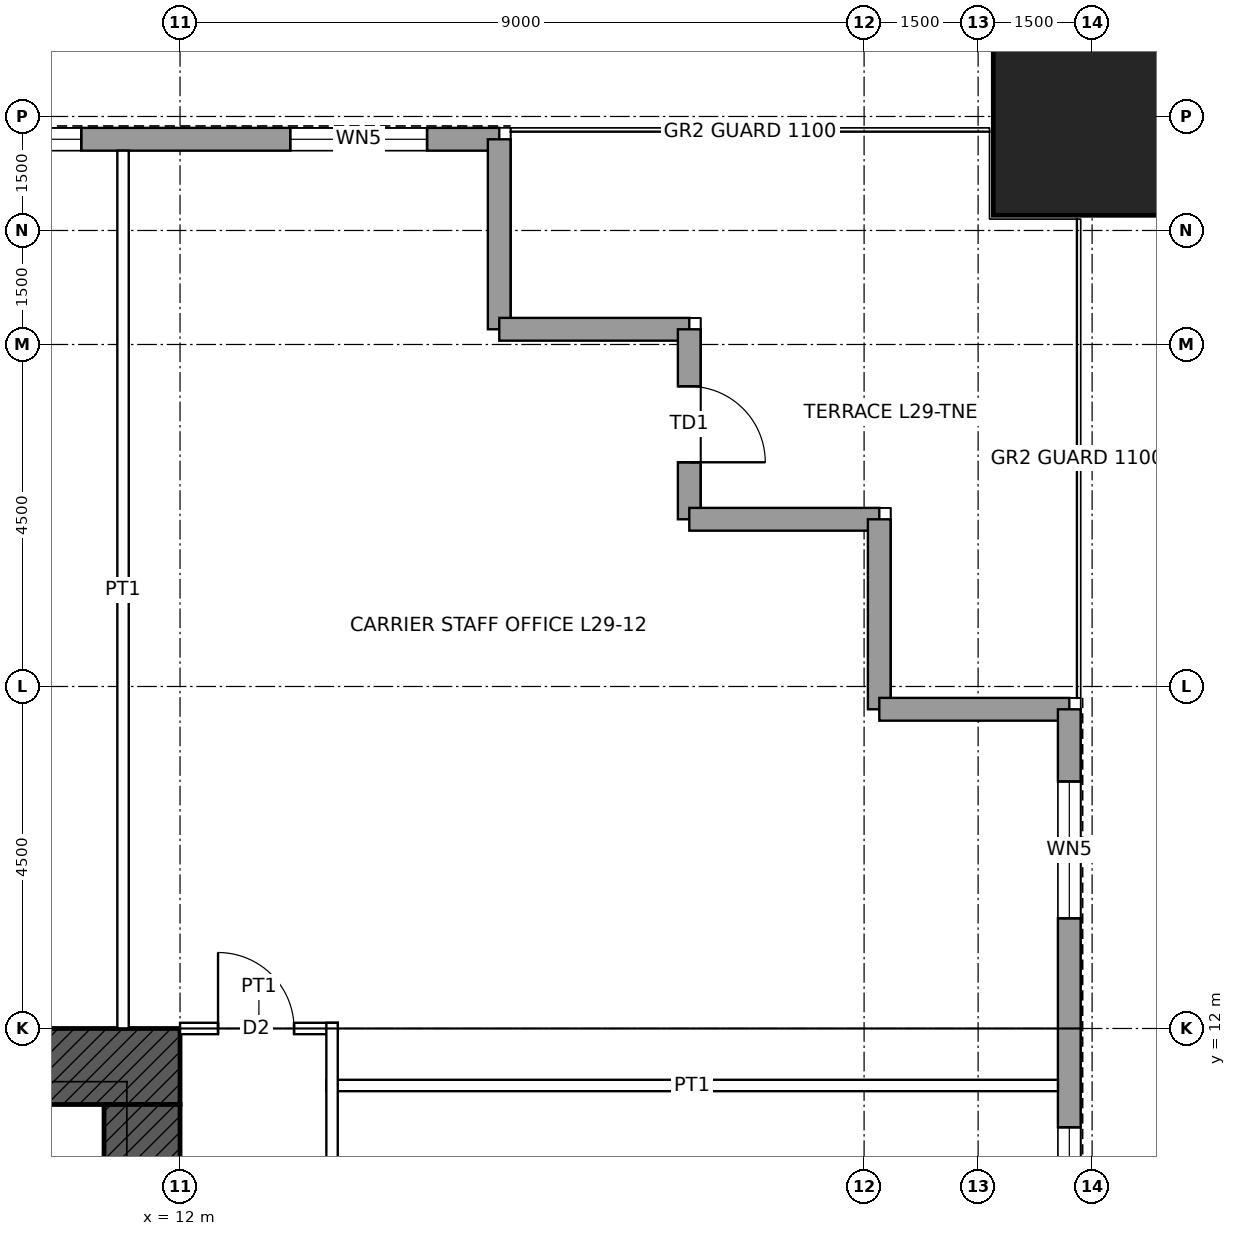
"""IFC4 building model, lengths in metres.
Left out: names, types, materials, properties, quantities, classifications, styles, units other than length and angle.
Written with IfcOpenShell. Run it as: python <this file> out.ifc"""

import sys

from ifc_helpers import new_model, si_unit, direction, frame, frame_2d, origin, origin_2d, place, context, subcontext, project, spatial, rectangle, hollow_rectangle, extrude, element, fill, save


model = new_model("IFC4")
c1 = context("Model", 3, precision=1e-05, world=origin(), true_north=direction((0.0, 1.0)))
c2 = subcontext(c1, "Body", "Model", "MODEL_VIEW")
j1 = project(units=[si_unit("LENGTHUNIT", "METRE"), si_unit("PLANEANGLEUNIT", "RADIAN")], contexts=[c1])
p1 = place(None, origin())
s1 = spatial("IfcSite", under=j1, at=p1, CompositionType="ELEMENT")
p2 = place(p1, origin())
s2 = spatial("IfcBuilding", under=s1, at=p2, CompositionType="ELEMENT")
p3 = place(p2, frame((0.0, 0.0, 144.9)))
s3 = spatial("IfcBuildingStorey", under=s2, at=p3, CompositionType="ELEMENT", Elevation=144.9)
p4 = place(p3, frame((24.0, 24.0, 0.0), z_axis=(0.0, 0.0, 1.0), x_axis=(1.0, 0.0, 0.0)))
e1 = element("IfcColumn", 1, at=p4, inside=s3, PredefinedType="COLUMN", context=c2, shape_type="SweptSolid", body=[
    extrude(hollow_rectangle(XDim=2.6, YDim=2.6, WallThickness=0.13, at=origin_2d()), origin(), (0.0, 0.0, 1.0), 4.5),
])
p5 = place(p3, frame((-12.0, 11.5, 0.0), z_axis=(0.0, 0.0, 1.0), x_axis=(1.0, 0.0, 0.0)))
e2 = element("IfcWall", 2, at=p5, inside=s3, PredefinedType="SHEAR", context=c2, shape_type="SweptSolid", body=[
    extrude(rectangle(XDim=24.0, YDim=1.0, at=frame_2d((12.0, 0.0))), origin(), (0.0, 0.0, 1.0), 4.5),
])
p6 = place(p5, frame((6.25, 0.0, 0.0)))
e3 = element("IfcOpeningElement", 3, at=p6, cuts=e2, PredefinedType="OPENING", context=c2, shape_type="SweptSolid", body=[
    extrude(rectangle(XDim=1.0, YDim=2.4, at=frame_2d((0.5, 1.2))), frame((0.0, 0.51, 0.0), z_axis=(0.0, -1.0, 0.0), x_axis=(1.0, 0.0, 0.0)), (0.0, 0.0, 1.0), 1.02),
])
p7 = place(p5, frame((16.75, 0.0, 0.0)))
e4 = element("IfcOpeningElement", 4, at=p7, cuts=e2, PredefinedType="OPENING", context=c2, shape_type="SweptSolid", body=[
    extrude(rectangle(XDim=1.0, YDim=2.4, at=frame_2d((0.5, 1.2))), frame((0.0, 0.51, 0.0), z_axis=(0.0, -1.0, 0.0), x_axis=(1.0, 0.0, 0.0)), (0.0, 0.0, 1.0), 1.02),
])
p8 = place(p3, frame((11.5, 11.0, 0.0), z_axis=(0.0, 0.0, 1.0), x_axis=(0.0, -1.0, 0.0)))
e5 = element("IfcWall", 5, at=p8, inside=s3, PredefinedType="SHEAR", context=c2, shape_type="SweptSolid", body=[
    extrude(rectangle(XDim=22.0, YDim=1.0, at=frame_2d((11.0, 0.0))), origin(), (0.0, 0.0, 1.0), 4.5),
])
p9 = place(p8, frame((10.5, 0.0, 0.0)))
e6 = element("IfcOpeningElement", 6, at=p9, cuts=e5, PredefinedType="OPENING", context=c2, shape_type="SweptSolid", body=[
    extrude(rectangle(XDim=1.0, YDim=2.4, at=frame_2d((0.5, 1.2))), frame((0.0, 0.51, 0.0), z_axis=(0.0, -1.0, 0.0), x_axis=(1.0, 0.0, 0.0)), (0.0, 0.0, 1.0), 1.02),
])
p10 = place(p3, frame((-16.2, 23.7, 0.0), z_axis=(0.0, 0.0, 1.0), x_axis=(1.0, 0.0, 0.0)))
e7 = element("IfcWall", 7, at=p10, inside=s3, PredefinedType="SOLIDWALL", context=c2, shape_type="SweptSolid", body=[
    extrude(rectangle(XDim=32.4, YDim=0.3, at=frame_2d((16.2, 0.0))), origin(), (0.0, 0.0, 1.0), 4.3),
])
p11 = place(p10, frame((0.95, 0.0, 1.0)))
e8 = element("IfcOpeningElement", 8, at=p11, cuts=e7, PredefinedType="OPENING", context=c2, shape_type="SweptSolid", body=[
    extrude(rectangle(XDim=1.8, YDim=1.2, at=frame_2d((0.9, 0.6))), frame((0.0, 0.16, 0.0), z_axis=(0.0, -1.0, 0.0), x_axis=(1.0, 0.0, 0.0)), (0.0, 0.0, 1.0), 0.32),
])
p12 = place(p10, frame((5.5, 0.0, 1.0)))
e9 = element("IfcOpeningElement", 9, at=p12, cuts=e7, PredefinedType="OPENING", context=c2, shape_type="SweptSolid", body=[
    extrude(rectangle(XDim=2.4, YDim=1.2, at=frame_2d((1.2, 0.6))), frame((0.0, 0.16, 0.0), z_axis=(0.0, -1.0, 0.0), x_axis=(1.0, 0.0, 0.0)), (0.0, 0.0, 1.0), 0.32),
])
p13 = place(p10, frame((9.5, 0.0, 1.0)))
e10 = element("IfcOpeningElement", 10, at=p13, cuts=e7, PredefinedType="OPENING", context=c2, shape_type="SweptSolid", body=[
    extrude(rectangle(XDim=2.4, YDim=1.2, at=frame_2d((1.2, 0.6))), frame((0.0, 0.16, 0.0), z_axis=(0.0, -1.0, 0.0), x_axis=(1.0, 0.0, 0.0)), (0.0, 0.0, 1.0), 0.32),
])
p14 = place(p10, frame((13.0, 0.0, 1.0)))
e11 = element("IfcOpeningElement", 11, at=p14, cuts=e7, PredefinedType="OPENING", context=c2, shape_type="SweptSolid", body=[
    extrude(rectangle(XDim=2.4, YDim=1.2, at=frame_2d((1.2, 0.6))), frame((0.0, 0.16, 0.0), z_axis=(0.0, -1.0, 0.0), x_axis=(1.0, 0.0, 0.0)), (0.0, 0.0, 1.0), 0.32),
])
p15 = place(p10, frame((17.0, 0.0, 1.0)))
e12 = element("IfcOpeningElement", 12, at=p15, cuts=e7, PredefinedType="OPENING", context=c2, shape_type="SweptSolid", body=[
    extrude(rectangle(XDim=2.4, YDim=1.2, at=frame_2d((1.2, 0.6))), frame((0.0, 0.16, 0.0), z_axis=(0.0, -1.0, 0.0), x_axis=(1.0, 0.0, 0.0)), (0.0, 0.0, 1.0), 0.32),
])
p16 = place(p10, frame((20.5, 0.0, 1.0)))
e13 = element("IfcOpeningElement", 13, at=p16, cuts=e7, PredefinedType="OPENING", context=c2, shape_type="SweptSolid", body=[
    extrude(rectangle(XDim=2.4, YDim=1.2, at=frame_2d((1.2, 0.6))), frame((0.0, 0.16, 0.0), z_axis=(0.0, -1.0, 0.0), x_axis=(1.0, 0.0, 0.0)), (0.0, 0.0, 1.0), 0.32),
])
p17 = place(p10, frame((24.5, 0.0, 1.0)))
e14 = element("IfcOpeningElement", 14, at=p17, cuts=e7, PredefinedType="OPENING", context=c2, shape_type="SweptSolid", body=[
    extrude(rectangle(XDim=2.4, YDim=1.2, at=frame_2d((1.2, 0.6))), frame((0.0, 0.16, 0.0), z_axis=(0.0, -1.0, 0.0), x_axis=(1.0, 0.0, 0.0)), (0.0, 0.0, 1.0), 0.32),
])
p18 = place(p10, frame((29.65, 0.0, 1.0)))
e15 = element("IfcOpeningElement", 15, at=p18, cuts=e7, PredefinedType="OPENING", context=c2, shape_type="SweptSolid", body=[
    extrude(rectangle(XDim=1.8, YDim=1.2, at=frame_2d((0.9, 0.6))), frame((0.0, 0.16, 0.0), z_axis=(0.0, -1.0, 0.0), x_axis=(1.0, 0.0, 0.0)), (0.0, 0.0, 1.0), 0.32),
])
for number, where, z_axis, x_axis in (
    (16, (16.2, 23.7, 0.0), (0.0, 0.0, 1.0), (0.0, -1.0, 0.0)),
    (17, (16.2, 21.2, 0.0), (0.0, 0.0, 1.0), (1.0, 0.0, 0.0)),
):
    element("IfcWall", number, at=place(p3, frame(where, z_axis=z_axis, x_axis=x_axis)), inside=s3, PredefinedType="SOLIDWALL", context=c2, shape_type="SweptSolid", body=[
        extrude(rectangle(XDim=2.5, YDim=0.3, at=frame_2d((1.25, 0.0))), origin(), (0.0, 0.0, 1.0), 4.3),
    ])
p19 = place(p3, frame((18.7, 21.2, 0.0), z_axis=(0.0, 0.0, 1.0), x_axis=(0.0, -1.0, 0.0)))
e18 = element("IfcWall", 18, at=p19, inside=s3, PredefinedType="SOLIDWALL", context=c2, shape_type="SweptSolid", body=[
    extrude(rectangle(XDim=2.5, YDim=0.3, at=frame_2d((1.25, 0.0))), origin(), (0.0, 0.0, 1.0), 4.3),
])
p20 = place(p19, frame((0.75, 0.0, 0.0)))
e19 = element("IfcOpeningElement", 19, at=p20, cuts=e18, PredefinedType="OPENING", context=c2, shape_type="SweptSolid", body=[
    extrude(rectangle(XDim=1.0, YDim=2.4, at=frame_2d((0.5, 1.2))), frame((0.0, 0.16, 0.0), z_axis=(0.0, -1.0, 0.0), x_axis=(1.0, 0.0, 0.0)), (0.0, 0.0, 1.0), 0.32),
])
for number, where, z_axis, x_axis in (
    (20, (18.7, 18.7, 0.0), (0.0, 0.0, 1.0), (1.0, 0.0, 0.0)),
    (21, (21.2, 18.7, 0.0), (0.0, 0.0, 1.0), (0.0, -1.0, 0.0)),
    (22, (21.2, 16.2, 0.0), (0.0, 0.0, 1.0), (1.0, 0.0, 0.0)),
):
    element("IfcWall", number, at=place(p3, frame(where, z_axis=z_axis, x_axis=x_axis)), inside=s3, PredefinedType="SOLIDWALL", context=c2, shape_type="SweptSolid", body=[
        extrude(rectangle(XDim=2.5, YDim=0.3, at=frame_2d((1.25, 0.0))), origin(), (0.0, 0.0, 1.0), 4.3),
    ])
p21 = place(p3, frame((23.7, 16.2, 0.0), z_axis=(0.0, 0.0, 1.0), x_axis=(0.0, -1.0, 0.0)))
e23 = element("IfcWall", 23, at=p21, inside=s3, PredefinedType="SOLIDWALL", context=c2, shape_type="SweptSolid", body=[
    extrude(rectangle(XDim=32.4, YDim=0.3, at=frame_2d((16.2, 0.0))), origin(), (0.0, 0.0, 1.0), 4.3),
])
p22 = place(p21, frame((0.95, 0.0, 1.0)))
e24 = element("IfcOpeningElement", 24, at=p22, cuts=e23, PredefinedType="OPENING", context=c2, shape_type="SweptSolid", body=[
    extrude(rectangle(XDim=1.8, YDim=1.2, at=frame_2d((0.9, 0.6))), frame((0.0, 0.16, 0.0), z_axis=(0.0, -1.0, 0.0), x_axis=(1.0, 0.0, 0.0)), (0.0, 0.0, 1.0), 0.32),
])
p23 = place(p21, frame((5.5, 0.0, 1.0)))
e25 = element("IfcOpeningElement", 25, at=p23, cuts=e23, PredefinedType="OPENING", context=c2, shape_type="SweptSolid", body=[
    extrude(rectangle(XDim=2.4, YDim=1.2, at=frame_2d((1.2, 0.6))), frame((0.0, 0.16, 0.0), z_axis=(0.0, -1.0, 0.0), x_axis=(1.0, 0.0, 0.0)), (0.0, 0.0, 1.0), 0.32),
])
p24 = place(p21, frame((9.5, 0.0, 1.0)))
e26 = element("IfcOpeningElement", 26, at=p24, cuts=e23, PredefinedType="OPENING", context=c2, shape_type="SweptSolid", body=[
    extrude(rectangle(XDim=2.4, YDim=1.2, at=frame_2d((1.2, 0.6))), frame((0.0, 0.16, 0.0), z_axis=(0.0, -1.0, 0.0), x_axis=(1.0, 0.0, 0.0)), (0.0, 0.0, 1.0), 0.32),
])
p25 = place(p21, frame((13.0, 0.0, 1.0)))
e27 = element("IfcOpeningElement", 27, at=p25, cuts=e23, PredefinedType="OPENING", context=c2, shape_type="SweptSolid", body=[
    extrude(rectangle(XDim=2.4, YDim=1.2, at=frame_2d((1.2, 0.6))), frame((0.0, 0.16, 0.0), z_axis=(0.0, -1.0, 0.0), x_axis=(1.0, 0.0, 0.0)), (0.0, 0.0, 1.0), 0.32),
])
p26 = place(p21, frame((17.0, 0.0, 1.0)))
e28 = element("IfcOpeningElement", 28, at=p26, cuts=e23, PredefinedType="OPENING", context=c2, shape_type="SweptSolid", body=[
    extrude(rectangle(XDim=2.4, YDim=1.2, at=frame_2d((1.2, 0.6))), frame((0.0, 0.16, 0.0), z_axis=(0.0, -1.0, 0.0), x_axis=(1.0, 0.0, 0.0)), (0.0, 0.0, 1.0), 0.32),
])
p27 = place(p21, frame((20.5, 0.0, 1.0)))
e29 = element("IfcOpeningElement", 29, at=p27, cuts=e23, PredefinedType="OPENING", context=c2, shape_type="SweptSolid", body=[
    extrude(rectangle(XDim=2.4, YDim=1.2, at=frame_2d((1.2, 0.6))), frame((0.0, 0.16, 0.0), z_axis=(0.0, -1.0, 0.0), x_axis=(1.0, 0.0, 0.0)), (0.0, 0.0, 1.0), 0.32),
])
p28 = place(p21, frame((24.5, 0.0, 1.0)))
e30 = element("IfcOpeningElement", 30, at=p28, cuts=e23, PredefinedType="OPENING", context=c2, shape_type="SweptSolid", body=[
    extrude(rectangle(XDim=2.4, YDim=1.2, at=frame_2d((1.2, 0.6))), frame((0.0, 0.16, 0.0), z_axis=(0.0, -1.0, 0.0), x_axis=(1.0, 0.0, 0.0)), (0.0, 0.0, 1.0), 0.32),
])
p29 = place(p21, frame((29.65, 0.0, 1.0)))
e31 = element("IfcOpeningElement", 31, at=p29, cuts=e23, PredefinedType="OPENING", context=c2, shape_type="SweptSolid", body=[
    extrude(rectangle(XDim=1.8, YDim=1.2, at=frame_2d((0.9, 0.6))), frame((0.0, 0.16, 0.0), z_axis=(0.0, -1.0, 0.0), x_axis=(1.0, 0.0, 0.0)), (0.0, 0.0, 1.0), 0.32),
])
p30 = place(p3, frame((13.925, 11.25, 0.0), z_axis=(0.0, 0.0, 1.0), x_axis=(1.0, 0.0, 0.0)))
e32 = element("IfcWall", 32, at=p30, inside=s3, PredefinedType="PARTITIONING", context=c2, shape_type="SweptSolid", body=[
    extrude(rectangle(XDim=9.625, YDim=0.15, at=frame_2d((4.812, 0.0))), origin(), (0.0, 0.0, 1.0), 3.431),
])
p31 = place(p3, frame((12.0, 12.0, 0.0), z_axis=(0.0, 0.0, 1.0), x_axis=(1.0, 0.0, 0.0)))
e33 = element("IfcWall", 33, at=p31, inside=s3, PredefinedType="PARTITIONING", context=c2, shape_type="SweptSolid", body=[
    extrude(rectangle(XDim=2.075, YDim=0.15, at=frame_2d((1.038, 0.0))), origin(), (0.0, 0.0, 1.0), 3.284),
])
p32 = place(p31, frame((0.5, 0.0, 0.0)))
e34 = element("IfcOpeningElement", 34, at=p32, cuts=e33, PredefinedType="OPENING", context=c2, shape_type="SweptSolid", body=[
    extrude(rectangle(XDim=1.0, YDim=2.1, at=frame_2d((0.5, 1.05))), frame((0.0, 0.085, 0.0), z_axis=(0.0, -1.0, 0.0), x_axis=(1.0, 0.0, 0.0)), (0.0, 0.0, 1.0), 0.17),
])
p33 = place(p3, frame((11.25, 12.0, 0.0), z_axis=(0.0, 0.0, 1.0), x_axis=(0.0, 1.0, 0.0)))
e35 = element("IfcWall", 35, at=p33, inside=s3, PredefinedType="PARTITIONING", context=c2, shape_type="SweptSolid", body=[
    extrude(rectangle(XDim=11.55, YDim=0.15, at=frame_2d((5.775, 0.0))), origin(), (0.0, 0.0, 1.0), 3.431),
])
p34 = place(p3, frame((14.0, -14.075, 0.0), z_axis=(0.0, 0.0, 1.0), x_axis=(0.0, 1.0, 0.0)))
e36 = element("IfcWall", 36, at=p34, inside=s3, PredefinedType="PARTITIONING", context=c2, shape_type="SweptSolid", body=[
    extrude(rectangle(XDim=26.15, YDim=0.15, at=frame_2d((13.075, 0.0))), origin(), (0.0, 0.0, 1.0), 4.3),
])
p35 = place(p34, frame((18.8, 0.0, 0.0)))
e37 = element("IfcOpeningElement", 37, at=p35, cuts=e36, PredefinedType="OPENING", context=c2, shape_type="SweptSolid", body=[
    extrude(rectangle(XDim=1.8, YDim=2.4, at=frame_2d((0.9, 1.2))), frame((0.0, 0.085, 0.0), z_axis=(0.0, -1.0, 0.0), x_axis=(1.0, 0.0, 0.0)), (0.0, 0.0, 1.0), 0.17),
])
p36 = place(p34, frame((7.55, 0.0, 0.0)))
e38 = element("IfcOpeningElement", 38, at=p36, cuts=e36, PredefinedType="OPENING", context=c2, shape_type="SweptSolid", body=[
    extrude(rectangle(XDim=1.8, YDim=2.4, at=frame_2d((0.9, 1.2))), frame((0.0, 0.085, 0.0), z_axis=(0.0, -1.0, 0.0), x_axis=(1.0, 0.0, 0.0)), (0.0, 0.0, 1.0), 0.17),
])
p37 = place(p17, origin())
e39 = element("IfcWindow", 39, at=p37, inside=s3, PartitioningType="SINGLE_PANEL", PredefinedType="WINDOW", context=c2, shape_type="SweptSolid", body=[
    extrude(rectangle(XDim=2.4, YDim=1.2, at=frame_2d((1.2, 0.6))), frame((0.0, 0.03, 0.0), z_axis=(0.0, -1.0, 0.0), x_axis=(1.0, 0.0, 0.0)), (0.0, 0.0, 1.0), 0.06),
])
fill(e14, e39)
p38 = place(p18, origin())
e40 = element("IfcWindow", 40, at=p38, inside=s3, PartitioningType="SINGLE_PANEL", PredefinedType="WINDOW", context=c2, shape_type="SweptSolid", body=[
    extrude(rectangle(XDim=1.8, YDim=1.2, at=frame_2d((0.9, 0.6))), frame((0.0, 0.03, 0.0), z_axis=(0.0, -1.0, 0.0), x_axis=(1.0, 0.0, 0.0)), (0.0, 0.0, 1.0), 0.06),
])
fill(e15, e40)
p39 = place(p20, origin())
e41 = element("IfcDoor", 41, at=p39, inside=s3, OperationType="SINGLE_SWING_RIGHT", PredefinedType="DOOR", context=c2, shape_type="SweptSolid", body=[
    extrude(rectangle(XDim=1.0, YDim=2.4, at=frame_2d((0.5, 1.2))), frame((0.0, 0.025, 0.0), z_axis=(0.0, -1.0, 0.0), x_axis=(1.0, 0.0, 0.0)), (0.0, 0.0, 1.0), 0.05),
])
fill(e19, e41)
p40 = place(p22, origin())
e42 = element("IfcWindow", 42, at=p40, inside=s3, PartitioningType="SINGLE_PANEL", PredefinedType="WINDOW", context=c2, shape_type="SweptSolid", body=[
    extrude(rectangle(XDim=1.8, YDim=1.2, at=frame_2d((0.9, 0.6))), frame((0.0, 0.03, 0.0), z_axis=(0.0, -1.0, 0.0), x_axis=(1.0, 0.0, 0.0)), (0.0, 0.0, 1.0), 0.06),
])
fill(e24, e42)
p41 = place(p23, origin())
e43 = element("IfcWindow", 43, at=p41, inside=s3, PartitioningType="SINGLE_PANEL", PredefinedType="WINDOW", context=c2, shape_type="SweptSolid", body=[
    extrude(rectangle(XDim=2.4, YDim=1.2, at=frame_2d((1.2, 0.6))), frame((0.0, 0.03, 0.0), z_axis=(0.0, -1.0, 0.0), x_axis=(1.0, 0.0, 0.0)), (0.0, 0.0, 1.0), 0.06),
])
fill(e25, e43)
p42 = place(p32, origin())
e44 = element("IfcDoor", 44, at=p42, inside=s3, OperationType="SINGLE_SWING_LEFT", PredefinedType="DOOR", context=c2, shape_type="SweptSolid", body=[
    extrude(rectangle(XDim=1.0, YDim=2.1, at=frame_2d((0.5, 1.05))), frame((0.0, 0.025, 0.0), z_axis=(0.0, -1.0, 0.0), x_axis=(1.0, 0.0, 0.0)), (0.0, 0.0, 1.0), 0.05),
])
fill(e34, e44)
save(model, sys.argv[1])
